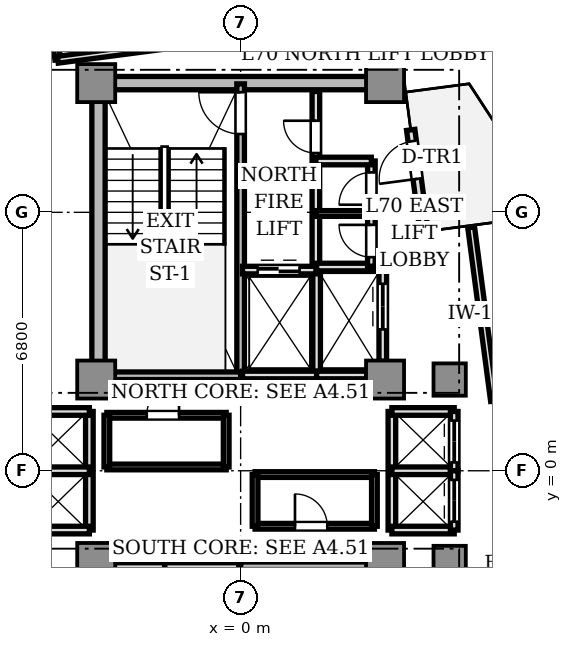
"""IFC4 building model, lengths in metres.
Left out: names, types, materials, properties, quantities, classifications, styles, units other than length and angle.
Written with IfcOpenShell. Run it as: python <this file> out.ifc"""

import sys

from ifc_helpers import new_model, si_unit, direction, frame, frame_2d, origin, origin_2d, place, context, subcontext, project, spatial, rectangle, extrude, source, transform, mapped, element, fill, save


model = new_model("IFC4")
c1 = context("Model", 3, precision=1e-05, world=origin(), true_north=direction((0.0, 1.0)))
c2 = subcontext(c1, "Body", "Model", "MODEL_VIEW")
j1 = project(units=[si_unit("LENGTHUNIT", "METRE"), si_unit("PLANEANGLEUNIT", "RADIAN")], contexts=[c1])
p1 = place(None, origin())
s1 = spatial("IfcSite", under=j1, at=p1, CompositionType="ELEMENT")
p2 = place(p1, origin())
s2 = spatial("IfcBuilding", under=s1, at=p2, CompositionType="ELEMENT")
p3 = place(p2, frame((0.0, 0.0, 251.2)))
s3 = spatial("IfcBuildingStorey", under=s2, at=p3, CompositionType="ELEMENT", Elevation=251.2)
p4 = place(p3, frame((-3.55, 10.2, 0.0), z_axis=(0.0, 0.0, 1.0), x_axis=(1.0, 0.0, 0.0)))
e1 = element("IfcWall", 1, at=p4, inside=s3, PredefinedType="SHEAR", context=c2, shape_type="SweptSolid", body=[
    extrude(rectangle(XDim=7.1, YDim=0.35, at=frame_2d((3.55, 0.0))), origin(), (0.0, 0.0, 1.0), 3.11),
])
p5 = place(p3, frame((-3.74, 2.85, 0.0), z_axis=(0.0, 0.0, 1.0), x_axis=(0.0, 1.0, 0.0)))
e2 = element("IfcWall", 2, at=p5, inside=s3, PredefinedType="SHEAR", context=c2, shape_type="SweptSolid", body=[
    extrude(rectangle(XDim=6.9, YDim=0.35, at=frame_2d((3.45, 0.0))), origin(), (0.0, 0.0, 1.0), 3.11),
])
m1 = source(origin(), c2, "Body", "SweptSolid", [
    extrude(rectangle(XDim=1.0, YDim=1.0, at=origin_2d()), origin(), (0.0, 0.0, 1.0), 3.11),
])
for number, where, z_axis, x_axis in (
    (3, (-3.8, 2.4, 0.0), (0.0, 0.0, 1.0), (1.0, 0.0, 0.0)),
    (4, (3.8, 2.4, 0.0), (0.0, 0.0, 1.0), (1.0, 0.0, 0.0)),
    (5, (-3.8, 10.2, 0.0), (0.0, 0.0, 1.0), (1.0, 0.0, 0.0)),
    (6, (3.8, 10.2, 0.0), (0.0, 0.0, 1.0), (1.0, 0.0, 0.0)),
    (7, (-3.8, -2.4, 0.0), (0.0, 0.0, 1.0), (1.0, 0.0, 0.0)),
    (8, (3.8, -2.4, 0.0), (0.0, 0.0, 1.0), (1.0, 0.0, 0.0)),
):
    element("IfcColumn", number, at=place(p3, frame(where, z_axis=z_axis, x_axis=x_axis)), inside=s3, PredefinedType="COLUMN", context=c2, shape_type="MappedRepresentation", body=[
        mapped(m1, transform((0.0, 0.0, 0.0), scale=1.0)),
    ])
m2 = source(origin(), c2, "Body", "SweptSolid", [
    extrude(rectangle(XDim=0.85, YDim=0.85, at=origin_2d()), origin(), (0.0, 0.0, 1.0), 3.11),
])
for number, where, z_axis, x_axis in (
    (9, (5.5, 2.4, 0.0), (0.0, 0.0, 1.0), (1.0, 0.0, 0.0)),
    (10, (5.5, -2.4, 0.0), (0.0, 0.0, 1.0), (1.0, 0.0, 0.0)),
):
    element("IfcColumn", number, at=place(p3, frame(where, z_axis=z_axis, x_axis=x_axis)), inside=s3, PredefinedType="COLUMN", context=c2, shape_type="MappedRepresentation", body=[
        mapped(m2, transform((0.0, 0.0, 0.0), scale=1.0)),
    ])
p6 = place(p3, frame((4.828, 6.292, 0.0), z_axis=(0.0, 0.0, 1.0), x_axis=(-0.130475563272, 0.991451525486, 0.0)))
e11 = element("IfcWall", 11, at=p6, inside=s3, PredefinedType="STANDARD", context=c2, shape_type="SweptSolid", body=[
    extrude(rectangle(XDim=2.7, YDim=0.22, at=frame_2d((1.35, 0.0))), origin(), (0.0, 0.0, 1.0), 3.11),
])
p7 = place(p6, frame((1.4, 0.0, 0.0)))
e12 = element("IfcOpeningElement", 12, at=p7, cuts=e11, PredefinedType="OPENING", context=c2, shape_type="SweptSolid", body=[
    extrude(rectangle(XDim=1.0, YDim=2.2, at=frame_2d((0.5, 1.1))), frame((0.0, 0.12, 0.0), z_axis=(0.0, -1.0, 0.0), x_axis=(1.0, 0.0, 0.0)), (0.0, 0.0, 1.0), 0.24),
])
p8 = place(p3, frame((0.0, 2.5, 0.0), z_axis=(0.0, 0.0, 1.0), x_axis=(0.0, 1.0, 0.0)))
e13 = element("IfcWall", 13, at=p8, inside=s3, PredefinedType="SOLIDWALL", context=c2, shape_type="SweptSolid", body=[
    extrude(rectangle(XDim=7.68, YDim=0.2, at=frame_2d((3.84, 0.0))), origin(), (0.0, 0.0, 1.0), 3.11),
])
p9 = place(p8, frame((6.36, 0.0, 0.0)))
e14 = element("IfcOpeningElement", 14, at=p9, cuts=e13, PredefinedType="OPENING", context=c2, shape_type="SweptSolid", body=[
    extrude(rectangle(XDim=1.1, YDim=2.15, at=frame_2d((0.55, 1.075))), frame((0.0, 0.11, 0.0), z_axis=(0.0, -1.0, 0.0), x_axis=(1.0, 0.0, 0.0)), (0.0, 0.0, 1.0), 0.22),
])
p10 = place(p3, frame((-3.72, 2.5, 0.0), z_axis=(0.0, 0.0, 1.0), x_axis=(1.0, 0.0, 0.0)))
e15 = element("IfcWall", 15, at=p10, inside=s3, PredefinedType="SOLIDWALL", context=c2, shape_type="SweptSolid", body=[
    extrude(rectangle(XDim=3.72, YDim=0.2, at=frame_2d((1.86, 0.0))), origin(), (0.0, 0.0, 1.0), 3.11),
])
p11 = place(p3, frame((0.0, -10.18, 0.0), z_axis=(0.0, 0.0, 1.0), x_axis=(0.0, 1.0, 0.0)))
e16 = element("IfcWall", 16, at=p11, inside=s3, PredefinedType="SOLIDWALL", context=c2, shape_type="SweptSolid", body=[
    extrude(rectangle(XDim=7.68, YDim=0.2, at=frame_2d((3.84, 0.0))), origin(), (0.0, 0.0, 1.0), 3.11),
])
p12 = place(p11, frame((0.28, 0.0, 0.0)))
e17 = element("IfcOpeningElement", 17, at=p12, cuts=e16, PredefinedType="OPENING", context=c2, shape_type="SweptSolid", body=[
    extrude(rectangle(XDim=1.1, YDim=2.15, at=frame_2d((0.55, 1.075))), frame((0.0, 0.11, 0.0), z_axis=(0.0, -1.0, 0.0), x_axis=(1.0, 0.0, 0.0)), (0.0, 0.0, 1.0), 0.22),
])
p13 = place(p3, frame((0.0, -2.5, 0.0), z_axis=(0.0, 0.0, 1.0), x_axis=(1.0, 0.0, 0.0)))
e18 = element("IfcWall", 18, at=p13, inside=s3, PredefinedType="SOLIDWALL", context=c2, shape_type="SweptSolid", body=[
    extrude(rectangle(XDim=3.72, YDim=0.2, at=frame_2d((1.86, 0.0))), origin(), (0.0, 0.0, 1.0), 3.11),
])
p14 = place(p3, frame((1.98, 5.32, 0.0), z_axis=(0.0, 0.0, 1.0), x_axis=(0.0, 1.0, 0.0)))
e19 = element("IfcWall", 19, at=p14, inside=s3, PredefinedType="SOLIDWALL", context=c2, shape_type="SweptSolid", body=[
    extrude(rectangle(XDim=4.66, YDim=0.2, at=frame_2d((2.33, 0.0))), origin(), (0.0, 0.0, 1.0), 2.66),
])
p15 = place(p14, frame((3.04, 0.0, 0.0)))
e20 = element("IfcOpeningElement", 20, at=p15, cuts=e19, PredefinedType="OPENING", context=c2, shape_type="SweptSolid", body=[
    extrude(rectangle(XDim=0.85, YDim=2.1, at=frame_2d((0.425, 1.05))), frame((0.0, 0.11, 0.0), z_axis=(0.0, -1.0, 0.0), x_axis=(1.0, 0.0, 0.0)), (0.0, 0.0, 1.0), 0.22),
])
p16 = place(p3, frame((2.0, 2.5, 0.0), z_axis=(0.0, 0.0, 1.0), x_axis=(0.0, 1.0, 0.0)))
e21 = element("IfcWall", 21, at=p16, inside=s3, PredefinedType="SOLIDWALL", context=c2, shape_type="SweptSolid", body=[
    extrude(rectangle(XDim=2.78, YDim=0.2, at=frame_2d((1.39, 0.0))), origin(), (0.0, 0.0, 1.0), 2.66),
])
p17 = place(p3, frame((0.05, 2.52, 0.0), z_axis=(0.0, 0.0, 1.0), x_axis=(1.0, 0.0, 0.0)))
e22 = element("IfcWall", 22, at=p17, inside=s3, PredefinedType="SOLIDWALL", context=c2, shape_type="SweptSolid", body=[
    extrude(rectangle(XDim=1.95, YDim=0.2, at=frame_2d((0.975, 0.0))), origin(), (0.0, 0.0, 1.0), 2.66),
])
p18 = place(p3, frame((0.05, 5.28, 0.0), z_axis=(0.0, 0.0, 1.0), x_axis=(1.0, 0.0, 0.0)))
e23 = element("IfcWall", 23, at=p18, inside=s3, PredefinedType="SOLIDWALL", context=c2, shape_type="SweptSolid", body=[
    extrude(rectangle(XDim=1.93, YDim=0.2, at=frame_2d((0.965, 0.0))), origin(), (0.0, 0.0, 1.0), 2.66),
])
p19 = place(p18, frame((0.4, 0.0, 0.0)))
e24 = element("IfcOpeningElement", 24, at=p19, cuts=e23, PredefinedType="OPENING", context=c2, shape_type="SweptSolid", body=[
    extrude(rectangle(XDim=1.1, YDim=2.2, at=frame_2d((0.55, 1.1))), frame((0.0, 0.11, 0.0), z_axis=(0.0, -1.0, 0.0), x_axis=(1.0, 0.0, 0.0)), (0.0, 0.0, 1.0), 0.22),
])
p20 = place(p3, frame((-2.0, -5.28, 0.0), z_axis=(0.0, 0.0, 1.0), x_axis=(0.0, 1.0, 0.0)))
e25 = element("IfcWall", 25, at=p20, inside=s3, PredefinedType="SOLIDWALL", context=c2, shape_type="SweptSolid", body=[
    extrude(rectangle(XDim=2.78, YDim=0.2, at=frame_2d((1.39, 0.0))), origin(), (0.0, 0.0, 1.0), 2.66),
])
p21 = place(p3, frame((-2.0, -2.52, 0.0), z_axis=(0.0, 0.0, 1.0), x_axis=(1.0, 0.0, 0.0)))
e26 = element("IfcWall", 26, at=p21, inside=s3, PredefinedType="SOLIDWALL", context=c2, shape_type="SweptSolid", body=[
    extrude(rectangle(XDim=1.95, YDim=0.2, at=frame_2d((0.975, 0.0))), origin(), (0.0, 0.0, 1.0), 2.66),
])
p22 = place(p3, frame((2.0, 2.52, 0.0), z_axis=(0.0, 0.0, 1.0), x_axis=(1.0, 0.0, 0.0)))
e27 = element("IfcWall", 27, at=p22, inside=s3, PredefinedType="SOLIDWALL", context=c2, shape_type="SweptSolid", body=[
    extrude(rectangle(XDim=1.32, YDim=0.2, at=frame_2d((0.66, 0.0))), origin(), (0.0, 0.0, 1.0), 2.66),
])
p23 = place(p3, frame((2.0, 5.36, 0.0), z_axis=(0.0, 0.0, 1.0), x_axis=(1.0, 0.0, 0.0)))
e28 = element("IfcWall", 28, at=p23, inside=s3, PredefinedType="SOLIDWALL", context=c2, shape_type="SweptSolid", body=[
    extrude(rectangle(XDim=1.74, YDim=0.2, at=frame_2d((0.87, 0.0))), origin(), (0.0, 0.0, 1.0), 2.66),
])
p24 = place(p3, frame((3.74, 2.88, 0.0), z_axis=(0.0, 0.0, 1.0), x_axis=(0.0, 1.0, 0.0)))
e29 = element("IfcWall", 29, at=p24, inside=s3, PredefinedType="SOLIDWALL", context=c2, shape_type="SweptSolid", body=[
    extrude(rectangle(XDim=2.48, YDim=0.2, at=frame_2d((1.24, 0.0))), origin(), (0.0, 0.0, 1.0), 2.66),
])
p25 = place(p24, frame((0.84, 0.0, 0.0)))
e30 = element("IfcOpeningElement", 30, at=p25, cuts=e29, PredefinedType="OPENING", context=c2, shape_type="SweptSolid", body=[
    extrude(rectangle(XDim=1.2, YDim=2.2, at=frame_2d((0.6, 1.1))), frame((0.0, 0.11, 0.0), z_axis=(0.0, -1.0, 0.0), x_axis=(1.0, 0.0, 0.0)), (0.0, 0.0, 1.0), 0.22),
])
p26 = place(p3, frame((-3.32, -2.52, 0.0), z_axis=(0.0, 0.0, 1.0), x_axis=(1.0, 0.0, 0.0)))
e31 = element("IfcWall", 31, at=p26, inside=s3, PredefinedType="SOLIDWALL", context=c2, shape_type="SweptSolid", body=[
    extrude(rectangle(XDim=1.32, YDim=0.2, at=frame_2d((0.66, 0.0))), origin(), (0.0, 0.0, 1.0), 2.66),
])
p27 = place(p3, frame((3.98, -1.56, 0.0), z_axis=(0.0, 0.0, 1.0), x_axis=(0.0, 1.0, 0.0)))
e32 = element("IfcWall", 32, at=p27, inside=s3, PredefinedType="SOLIDWALL", context=c2, shape_type="SweptSolid", body=[
    extrude(rectangle(XDim=3.12, YDim=0.2, at=frame_2d((1.56, 0.0))), origin(), (0.0, 0.0, 1.0), 2.33),
])
for number, where, z_axis, x_axis in (
    (33, (3.98, 1.56, 0.0), (0.0, 0.0, 1.0), (1.0, 0.0, 0.0)),
    (34, (3.98, -1.56, 0.0), (0.0, 0.0, 1.0), (1.0, 0.0, 0.0)),
    (35, (3.98, 0.0, 0.0), (0.0, 0.0, 1.0), (1.0, 0.0, 0.0)),
):
    element("IfcWall", number, at=place(p3, frame(where, z_axis=z_axis, x_axis=x_axis)), inside=s3, PredefinedType="SOLIDWALL", context=c2, shape_type="SweptSolid", body=[
        extrude(rectangle(XDim=1.64, YDim=0.2, at=frame_2d((0.82, 0.0))), origin(), (0.0, 0.0, 1.0), 2.66),
    ])
p28 = place(p3, frame((5.62, 0.0, 0.0), z_axis=(0.0, 0.0, 1.0), x_axis=(0.0, 1.0, 0.0)))
e36 = element("IfcWall", 36, at=p28, inside=s3, PredefinedType="SOLIDWALL", context=c2, shape_type="SweptSolid", body=[
    extrude(rectangle(XDim=1.56, YDim=0.2, at=frame_2d((0.78, 0.0))), origin(), (0.0, 0.0, 1.0), 2.66),
])
p29 = place(p28, frame((0.22, 0.0, 0.0)))
e37 = element("IfcOpeningElement", 37, at=p29, cuts=e36, PredefinedType="OPENING", context=c2, shape_type="SweptSolid", body=[
    extrude(rectangle(XDim=1.1, YDim=2.2, at=frame_2d((0.55, 1.1))), frame((0.0, 0.11, 0.0), z_axis=(0.0, -1.0, 0.0), x_axis=(1.0, 0.0, 0.0)), (0.0, 0.0, 1.0), 0.22),
])
p30 = place(p3, frame((5.62, -1.56, 0.0), z_axis=(0.0, 0.0, 1.0), x_axis=(0.0, 1.0, 0.0)))
e38 = element("IfcWall", 38, at=p30, inside=s3, PredefinedType="SOLIDWALL", context=c2, shape_type="SweptSolid", body=[
    extrude(rectangle(XDim=1.56, YDim=0.2, at=frame_2d((0.78, 0.0))), origin(), (0.0, 0.0, 1.0), 2.66),
])
p31 = place(p30, frame((0.22, 0.0, 0.0)))
e39 = element("IfcOpeningElement", 39, at=p31, cuts=e38, PredefinedType="OPENING", context=c2, shape_type="SweptSolid", body=[
    extrude(rectangle(XDim=1.1, YDim=2.2, at=frame_2d((0.55, 1.1))), frame((0.0, 0.11, 0.0), z_axis=(0.0, -1.0, 0.0), x_axis=(1.0, 0.0, 0.0)), (0.0, 0.0, 1.0), 0.22),
])
p32 = place(p3, frame((-3.98, -1.56, 0.0), z_axis=(0.0, 0.0, 1.0), x_axis=(0.0, 1.0, 0.0)))
e40 = element("IfcWall", 40, at=p32, inside=s3, PredefinedType="SOLIDWALL", context=c2, shape_type="SweptSolid", body=[
    extrude(rectangle(XDim=3.12, YDim=0.2, at=frame_2d((1.56, 0.0))), origin(), (0.0, 0.0, 1.0), 2.33),
])
for number, where, z_axis, x_axis in (
    (41, (-5.62, 1.56, 0.0), (0.0, 0.0, 1.0), (1.0, 0.0, 0.0)),
    (42, (-5.62, -1.56, 0.0), (0.0, 0.0, 1.0), (1.0, 0.0, 0.0)),
    (43, (-5.62, 0.0, 0.0), (0.0, 0.0, 1.0), (1.0, 0.0, 0.0)),
):
    element("IfcWall", number, at=place(p3, frame(where, z_axis=z_axis, x_axis=x_axis)), inside=s3, PredefinedType="SOLIDWALL", context=c2, shape_type="SweptSolid", body=[
        extrude(rectangle(XDim=1.64, YDim=0.2, at=frame_2d((0.82, 0.0))), origin(), (0.0, 0.0, 1.0), 2.66),
    ])
p33 = place(p3, frame((3.44, 5.38, 0.0), z_axis=(0.0, 0.0, 1.0), x_axis=(0.0, 1.0, 0.0)))
e44 = element("IfcWall", 44, at=p33, inside=s3, PredefinedType="SOLIDWALL", context=c2, shape_type="SweptSolid", body=[
    extrude(rectangle(XDim=2.77, YDim=0.2, at=frame_2d((1.385, 0.0))), origin(), (0.0, 0.0, 1.0), 2.66),
])
p34 = place(p33, frame((0.24, 0.0, 0.0)))
e45 = element("IfcOpeningElement", 45, at=p34, cuts=e44, PredefinedType="OPENING", context=c2, shape_type="SweptSolid", body=[
    extrude(rectangle(XDim=0.85, YDim=2.1, at=frame_2d((0.425, 1.05))), frame((0.0, 0.11, 0.0), z_axis=(0.0, -1.0, 0.0), x_axis=(1.0, 0.0, 0.0)), (0.0, 0.0, 1.0), 0.22),
])
p35 = place(p33, frame((1.62, 0.0, 0.0)))
e46 = element("IfcOpeningElement", 46, at=p35, cuts=e44, PredefinedType="OPENING", context=c2, shape_type="SweptSolid", body=[
    extrude(rectangle(XDim=0.85, YDim=2.1, at=frame_2d((0.425, 1.05))), frame((0.0, 0.11, 0.0), z_axis=(0.0, -1.0, 0.0), x_axis=(1.0, 0.0, 0.0)), (0.0, 0.0, 1.0), 0.22),
])
p36 = place(p3, frame((1.98, 8.15, 0.0), z_axis=(0.0, 0.0, 1.0), x_axis=(1.0, 0.0, 0.0)))
e47 = element("IfcWall", 47, at=p36, inside=s3, PredefinedType="SOLIDWALL", context=c2, shape_type="SweptSolid", body=[
    extrude(rectangle(XDim=1.46, YDim=0.2, at=frame_2d((0.73, 0.0))), origin(), (0.0, 0.0, 1.0), 2.66),
])
p37 = place(p3, frame((1.98, 6.77, 0.0), z_axis=(0.0, 0.0, 1.0), x_axis=(1.0, 0.0, 0.0)))
e48 = element("IfcWall", 48, at=p37, inside=s3, PredefinedType="PARTITIONING", context=c2, shape_type="SweptSolid", body=[
    extrude(rectangle(XDim=1.46, YDim=0.15, at=frame_2d((0.73, 0.0))), origin(), (0.0, 0.0, 1.0), 2.66),
])
p38 = place(p3, frame((-3.52, 0.1, 0.0), z_axis=(0.0, 0.0, 1.0), x_axis=(1.0, 0.0, 0.0)))
e49 = element("IfcWall", 49, at=p38, inside=s3, PredefinedType="PARTITIONING", context=c2, shape_type="SweptSolid", body=[
    extrude(rectangle(XDim=3.14, YDim=0.15, at=frame_2d((1.57, 0.0))), origin(), (0.0, 0.0, 1.0), 2.66),
])
p39 = place(p3, frame((-3.52, 1.46, 0.0), z_axis=(0.0, 0.0, 1.0), x_axis=(1.0, 0.0, 0.0)))
e50 = element("IfcWall", 50, at=p39, inside=s3, PredefinedType="PARTITIONING", context=c2, shape_type="SweptSolid", body=[
    extrude(rectangle(XDim=3.14, YDim=0.15, at=frame_2d((1.57, 0.0))), origin(), (0.0, 0.0, 1.0), 2.66),
])
p40 = place(p39, frame((1.05, 0.0, 0.0)))
e51 = element("IfcOpeningElement", 51, at=p40, cuts=e50, PredefinedType="OPENING", context=c2, shape_type="SweptSolid", body=[
    extrude(rectangle(XDim=0.85, YDim=2.1, at=frame_2d((0.425, 1.05))), frame((0.0, 0.085, 0.0), z_axis=(0.0, -1.0, 0.0), x_axis=(1.0, 0.0, 0.0)), (0.0, 0.0, 1.0), 0.17),
])
p41 = place(p3, frame((-3.52, 0.1, 0.0), z_axis=(0.0, 0.0, 1.0), x_axis=(0.0, 1.0, 0.0)))
e52 = element("IfcWall", 52, at=p41, inside=s3, PredefinedType="PARTITIONING", context=c2, shape_type="SweptSolid", body=[
    extrude(rectangle(XDim=1.36, YDim=0.15, at=frame_2d((0.68, 0.0))), origin(), (0.0, 0.0, 1.0), 2.33),
])
p42 = place(p3, frame((-0.38, 0.1, 0.0), z_axis=(0.0, 0.0, 1.0), x_axis=(0.0, 1.0, 0.0)))
e53 = element("IfcWall", 53, at=p42, inside=s3, PredefinedType="PARTITIONING", context=c2, shape_type="SweptSolid", body=[
    extrude(rectangle(XDim=1.36, YDim=0.15, at=frame_2d((0.68, 0.0))), origin(), (0.0, 0.0, 1.0), 2.66),
])
p43 = place(p3, frame((0.38, -0.1, 0.0), z_axis=(0.0, 0.0, 1.0), x_axis=(1.0, 0.0, 0.0)))
e54 = element("IfcWall", 54, at=p43, inside=s3, PredefinedType="PARTITIONING", context=c2, shape_type="SweptSolid", body=[
    extrude(rectangle(XDim=3.14, YDim=0.15, at=frame_2d((1.57, 0.0))), origin(), (0.0, 0.0, 1.0), 2.66),
])
p44 = place(p3, frame((0.38, -1.46, 0.0), z_axis=(0.0, 0.0, 1.0), x_axis=(1.0, 0.0, 0.0)))
e55 = element("IfcWall", 55, at=p44, inside=s3, PredefinedType="PARTITIONING", context=c2, shape_type="SweptSolid", body=[
    extrude(rectangle(XDim=3.14, YDim=0.15, at=frame_2d((1.57, 0.0))), origin(), (0.0, 0.0, 1.0), 2.66),
])
p45 = place(p44, frame((1.05, 0.0, 0.0)))
e56 = element("IfcOpeningElement", 56, at=p45, cuts=e55, PredefinedType="OPENING", context=c2, shape_type="SweptSolid", body=[
    extrude(rectangle(XDim=0.85, YDim=2.1, at=frame_2d((0.425, 1.05))), frame((0.0, 0.085, 0.0), z_axis=(0.0, -1.0, 0.0), x_axis=(1.0, 0.0, 0.0)), (0.0, 0.0, 1.0), 0.17),
])
p46 = place(p3, frame((0.38, -1.46, 0.0), z_axis=(0.0, 0.0, 1.0), x_axis=(0.0, 1.0, 0.0)))
e57 = element("IfcWall", 57, at=p46, inside=s3, PredefinedType="PARTITIONING", context=c2, shape_type="SweptSolid", body=[
    extrude(rectangle(XDim=1.36, YDim=0.15, at=frame_2d((0.68, 0.0))), origin(), (0.0, 0.0, 1.0), 2.66),
])
p47 = place(p3, frame((3.52, -1.46, 0.0), z_axis=(0.0, 0.0, 1.0), x_axis=(0.0, 1.0, 0.0)))
e58 = element("IfcWall", 58, at=p47, inside=s3, PredefinedType="PARTITIONING", context=c2, shape_type="SweptSolid", body=[
    extrude(rectangle(XDim=1.36, YDim=0.15, at=frame_2d((0.68, 0.0))), origin(), (0.0, 0.0, 1.0), 2.33),
])
p48 = place(p3, frame((6.667, 1.836, 0.0), z_axis=(0.0, 0.0, 1.0), x_axis=(-0.130546336939, 0.991442209063, 0.0)))
e59 = element("IfcWall", 59, at=p48, inside=s3, PredefinedType="PARTITIONING", context=c2, shape_type="SweptSolid", body=[
    extrude(rectangle(XDim=4.608, YDim=0.18, at=frame_2d((2.304, 0.0))), origin(), (0.0, 0.0, 1.0), 2.66),
])
p49 = place(p3, frame((-4.811, 10.815, 0.0), z_axis=(0.0, 0.0, 1.0), x_axis=(-0.130550479699, 0.991441663564, 0.0)))
e60 = element("IfcWall", 60, at=p49, inside=s3, PredefinedType="PARTITIONING", context=c2, shape_type="SweptSolid", body=[
    extrude(rectangle(XDim=3.817, YDim=0.15, at=frame_2d((1.908, 0.0))), origin(), (0.0, 0.0, 1.0), 2.66),
])
p50 = place(p49, frame((0.403, 0.0, 0.0)))
e61 = element("IfcOpeningElement", 61, at=p50, cuts=e60, PredefinedType="OPENING", context=c2, shape_type="SweptSolid", body=[
    extrude(rectangle(XDim=0.85, YDim=2.1, at=frame_2d((0.425, 1.05))), frame((0.0, 0.085, 0.0), z_axis=(0.0, -1.0, 0.0), x_axis=(1.0, 0.0, 0.0)), (0.0, 0.0, 1.0), 0.17),
])
p51 = place(p49, frame((2.312, 0.0, 0.0)))
e62 = element("IfcOpeningElement", 62, at=p51, cuts=e60, PredefinedType="OPENING", context=c2, shape_type="SweptSolid", body=[
    extrude(rectangle(XDim=0.85, YDim=2.1, at=frame_2d((0.425, 1.05))), frame((0.0, 0.085, 0.0), z_axis=(0.0, -1.0, 0.0), x_axis=(1.0, 0.0, 0.0)), (0.0, 0.0, 1.0), 0.17),
])
p52 = place(p3, frame((4.029, 11.979, 0.0), z_axis=(0.0, 0.0, 1.0), x_axis=(-0.991444413588, -0.130529593448, 0.0)))
e63 = element("IfcWall", 63, at=p52, inside=s3, PredefinedType="PARTITIONING", context=c2, shape_type="SweptSolid", body=[
    extrude(rectangle(XDim=8.916, YDim=0.18, at=frame_2d((4.458, 0.0))), origin(), (0.0, 0.0, 1.0), 2.66),
])
m3 = source(origin(), c2, "Body", "SweptSolid", [
    extrude(rectangle(XDim=1.0, YDim=0.05, at=origin_2d()), origin(), (0.0, 0.0, 1.0), 2.2),
])
p53 = place(p7, frame((0.5, 0.0, 0.0)))
e64 = element("IfcDoor", 64, at=p53, inside=s3, OperationType="SINGLE_SWING_LEFT", PredefinedType="DOOR", context=c2, shape_type="MappedRepresentation", body=[
    mapped(m3, transform((0.0, 0.0, 0.0), scale=1.0)),
])
fill(e12, e64)
m4 = source(origin(), c2, "Body", "SweptSolid", [
    extrude(rectangle(XDim=1.1, YDim=0.05, at=origin_2d()), origin(), (0.0, 0.0, 1.0), 2.15),
])
p54 = place(p9, frame((0.55, 0.0, 0.0)))
e65 = element("IfcDoor", 65, at=p54, inside=s3, OperationType="SINGLE_SWING_RIGHT", PredefinedType="DOOR", context=c2, shape_type="MappedRepresentation", body=[
    mapped(m4, transform((0.0, 0.0, 0.0), scale=1.0)),
])
fill(e14, e65)
m5 = source(origin(), c2, "Body", "SweptSolid", [
    extrude(rectangle(XDim=0.85, YDim=0.05, at=origin_2d()), origin(), (0.0, 0.0, 1.0), 2.1),
])
p55 = place(p15, frame((0.425, 0.0, 0.0)))
e66 = element("IfcDoor", 66, at=p55, inside=s3, OperationType="SINGLE_SWING_RIGHT", PredefinedType="DOOR", context=c2, shape_type="MappedRepresentation", body=[
    mapped(m5, transform((0.0, 0.0, 0.0), scale=1.0)),
])
fill(e20, e66)
m6 = source(origin(), c2, "Body", "SweptSolid", [
    extrude(rectangle(XDim=1.1, YDim=0.05, at=origin_2d()), origin(), (0.0, 0.0, 1.0), 2.2),
])
p56 = place(p19, frame((0.55, 0.0, 0.0)))
e67 = element("IfcDoor", 67, at=p56, inside=s3, OperationType="DOUBLE_DOOR_SLIDING", PredefinedType="DOOR", context=c2, shape_type="MappedRepresentation", body=[
    mapped(m6, transform((0.0, 0.0, 0.0), scale=1.0)),
])
fill(e24, e67)
m7 = source(origin(), c2, "Body", "SweptSolid", [
    extrude(rectangle(XDim=1.2, YDim=0.05, at=origin_2d()), origin(), (0.0, 0.0, 1.0), 2.2),
])
p57 = place(p25, frame((0.6, 0.0, 0.0)))
e68 = element("IfcDoor", 68, at=p57, inside=s3, OperationType="DOUBLE_DOOR_SLIDING", PredefinedType="DOOR", context=c2, shape_type="MappedRepresentation", body=[
    mapped(m7, transform((0.0, 0.0, 0.0), scale=1.0)),
])
fill(e30, e68)
p58 = place(p29, frame((0.55, 0.0, 0.0)))
e69 = element("IfcDoor", 69, at=p58, inside=s3, OperationType="DOUBLE_DOOR_SLIDING", PredefinedType="DOOR", context=c2, shape_type="MappedRepresentation", body=[
    mapped(m6, transform((0.0, 0.0, 0.0), scale=1.0)),
])
fill(e37, e69)
p59 = place(p31, frame((0.55, 0.0, 0.0)))
e70 = element("IfcDoor", 70, at=p59, inside=s3, OperationType="DOUBLE_DOOR_SLIDING", PredefinedType="DOOR", context=c2, shape_type="MappedRepresentation", body=[
    mapped(m6, transform((0.0, 0.0, 0.0), scale=1.0)),
])
fill(e39, e70)
p60 = place(p34, frame((0.425, 0.0, 0.0)))
e71 = element("IfcDoor", 71, at=p60, inside=s3, OperationType="SINGLE_SWING_RIGHT", PredefinedType="DOOR", context=c2, shape_type="MappedRepresentation", body=[
    mapped(m5, transform((0.0, 0.0, 0.0), scale=1.0)),
])
fill(e45, e71)
p61 = place(p35, frame((0.425, 0.0, 0.0)))
e72 = element("IfcDoor", 72, at=p61, inside=s3, OperationType="SINGLE_SWING_LEFT", PredefinedType="DOOR", context=c2, shape_type="MappedRepresentation", body=[
    mapped(m5, transform((0.0, 0.0, 0.0), scale=1.0)),
])
fill(e46, e72)
p62 = place(p40, frame((0.425, 0.0, 0.0)))
e73 = element("IfcDoor", 73, at=p62, inside=s3, OperationType="SINGLE_SWING_RIGHT", PredefinedType="DOOR", context=c2, shape_type="MappedRepresentation", body=[
    mapped(m5, transform((0.0, 0.0, 0.0), scale=1.0)),
])
fill(e51, e73)
p63 = place(p45, frame((0.425, 0.0, 0.0)))
e74 = element("IfcDoor", 74, at=p63, inside=s3, OperationType="SINGLE_SWING_LEFT", PredefinedType="DOOR", context=c2, shape_type="MappedRepresentation", body=[
    mapped(m5, transform((0.0, 0.0, 0.0), scale=1.0)),
])
fill(e56, e74)
save(model, sys.argv[1])
